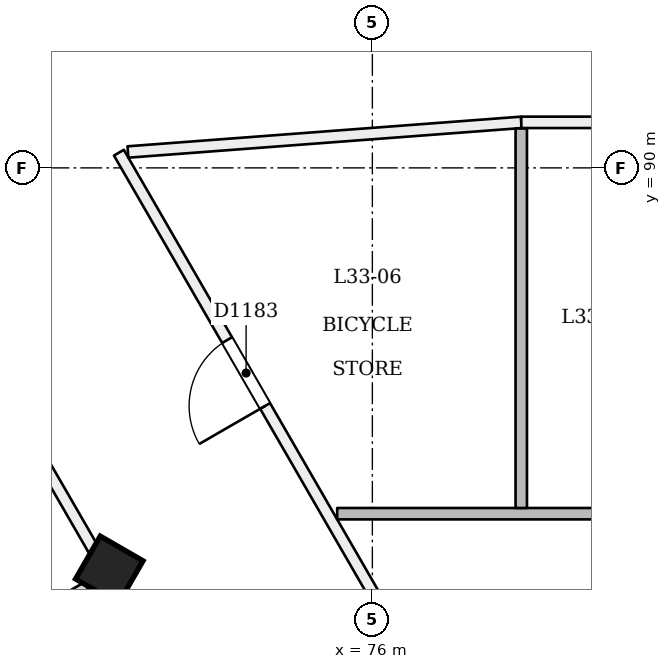
"""IFC4 building model, lengths in metres.
Left out: names, types, materials, properties, quantities, classifications, styles, units other than length and angle.
Written with IfcOpenShell. Run it as: python <this file> out.ifc"""

import sys

from ifc_helpers import new_model, si_unit, direction, frame, frame_2d, origin, origin_2d, place, context, subcontext, project, spatial, rectangle, extrude, element, fill, save


model = new_model("IFC4")
c1 = context("Model", 3, precision=1e-05, world=origin(), true_north=direction((0.0, 1.0)))
c2 = subcontext(c1, "Body", "Model", "MODEL_VIEW")
j1 = project(units=[si_unit("LENGTHUNIT", "METRE"), si_unit("PLANEANGLEUNIT", "RADIAN")], contexts=[c1])
p1 = place(None, origin())
s1 = spatial("IfcSite", under=j1, at=p1, CompositionType="ELEMENT")
p2 = place(p1, origin())
s2 = spatial("IfcBuilding", under=s1, at=p2, CompositionType="ELEMENT")
p3 = place(p2, frame((0.0, 0.0, 131.4)))
s3 = spatial("IfcBuildingStorey", under=s2, at=p3, CompositionType="ELEMENT", Elevation=131.4)
p4 = place(p3, frame((72.512, 84.664, -0.02), z_axis=(0.02215519141, 0.038415882353, 0.999016199807), x_axis=(-0.86536461293, -0.499669007942, 0.038405327632)))
e1 = element("IfcColumn", 1, at=p4, inside=s3, PredefinedType="COLUMN", context=c2, shape_type="SweptSolid", body=[
    extrude(rectangle(XDim=0.65, YDim=0.65, at=origin_2d()), origin(), (0.0, 0.0, 1.0), 3.604),
])
p5 = place(p3, frame((85.0, 68.836, 0.0), z_axis=(0.0, 0.0, 1.0), x_axis=(-0.500001726771, 0.86602440683, 0.0)))
e2 = element("IfcWall", 2, at=p5, inside=s3, PredefinedType="PARTITIONING", context=c2, shape_type="SweptSolid", body=[
    extrude(rectangle(XDim=24.669, YDim=0.15, at=frame_2d((12.335, 0.0))), origin(), (0.0, 0.0, 1.0), 3.15),
])
p6 = place(p5, frame((2.99, 0.0, 0.0)))
e3 = element("IfcOpeningElement", 3, at=p6, cuts=e2, PredefinedType="OPENING", context=c2, shape_type="SweptSolid", body=[
    extrude(rectangle(XDim=1.0, YDim=2.1, at=frame_2d((0.5, 1.05))), frame((0.0, 0.085, 0.0), z_axis=(0.0, -1.0, 0.0), x_axis=(1.0, 0.0, 0.0)), (0.0, 0.0, 1.0), 0.171),
])
p7 = place(p5, frame((15.596, 0.0, 0.0)))
e4 = element("IfcOpeningElement", 4, at=p7, cuts=e2, PredefinedType="OPENING", context=c2, shape_type="SweptSolid", body=[
    extrude(rectangle(XDim=1.0, YDim=2.1, at=frame_2d((0.5, 1.05))), frame((0.0, 0.085, 0.0), z_axis=(0.0, -1.0, 0.0), x_axis=(1.0, 0.0, 0.0)), (0.0, 0.0, 1.0), 0.171),
])
p8 = place(p5, frame((20.822, 0.0, 0.0)))
e5 = element("IfcOpeningElement", 5, at=p8, cuts=e2, PredefinedType="OPENING", context=c2, shape_type="SweptSolid", body=[
    extrude(rectangle(XDim=1.0, YDim=2.1, at=frame_2d((0.5, 1.05))), frame((0.0, 0.085, 0.0), z_axis=(0.0, -1.0, 0.0), x_axis=(1.0, 0.0, 0.0)), (0.0, 0.0, 1.0), 0.171),
])
p9 = place(p5, frame((11.43, 0.0, 0.0)))
e6 = element("IfcOpeningElement", 6, at=p9, cuts=e2, PredefinedType="OPENING", context=c2, shape_type="SweptSolid", body=[
    extrude(rectangle(XDim=1.0, YDim=2.1, at=frame_2d((0.5, 1.05))), frame((0.0, 0.085, 0.0), z_axis=(0.0, -1.0, 0.0), x_axis=(1.0, 0.0, 0.0)), (0.0, 0.0, 1.0), 0.171),
])
p10 = place(p5, frame((7.41, 0.0, 0.0)))
e7 = element("IfcOpeningElement", 7, at=p10, cuts=e2, PredefinedType="OPENING", context=c2, shape_type="SweptSolid", body=[
    extrude(rectangle(XDim=1.0, YDim=2.1, at=frame_2d((0.5, 1.05))), frame((0.0, 0.085, 0.0), z_axis=(0.0, -1.0, 0.0), x_axis=(1.0, 0.0, 0.0)), (0.0, 0.0, 1.0), 0.171),
])
p11 = place(p3, frame((72.784, 90.209, 0.0), z_axis=(0.0, 0.0, 1.0), x_axis=(0.997170112463, 0.075178233616, 0.0)))
e8 = element("IfcWall", 8, at=p11, inside=s3, PredefinedType="PARTITIONING", context=c2, shape_type="SweptSolid", body=[
    extrude(rectangle(XDim=5.189, YDim=0.15, at=frame_2d((2.595, 0.0))), origin(), (0.0, 0.0, 1.0), 3.15),
])
p12 = place(p3, frame((77.959, 90.599, 0.0), z_axis=(0.0, 0.0, 1.0), x_axis=(0.9999999708, 0.000241662632, 0.0)))
e9 = element("IfcWall", 9, at=p12, inside=s3, PredefinedType="PARTITIONING", context=c2, shape_type="SweptSolid", body=[
    extrude(rectangle(XDim=4.041, YDim=0.15, at=frame_2d((2.021, 0.0))), origin(), (0.0, 0.0, 1.0), 3.15),
])
p13 = place(p12, frame((1.52, 0.0, 0.0)))
e10 = element("IfcOpeningElement", 10, at=p13, cuts=e9, PredefinedType="OPENING", context=c2, shape_type="SweptSolid", body=[
    extrude(rectangle(XDim=1.0, YDim=2.1, at=frame_2d((0.5, 1.05))), frame((0.0, 0.085, 0.0), z_axis=(0.0, -1.0, 0.0), x_axis=(1.0, 0.0, 0.0)), (0.0, 0.0, 1.0), 0.171),
])
p14 = place(p3, frame((64.656, 98.273, 0.0), z_axis=(0.0, 0.0, 1.0), x_axis=(0.500001784794, -0.866024373331, 0.0)))
e11 = element("IfcWall", 11, at=p14, inside=s3, PredefinedType="PARTITIONING", context=c2, shape_type="SweptSolid", body=[
    extrude(rectangle(XDim=40.426, YDim=0.15, at=frame_2d((20.213, 0.0))), origin(), (0.0, 0.0, 1.0), 2.75),
])
p15 = place(p14, frame((0.2, 0.0, 0.0)))
e12 = element("IfcOpeningElement", 12, at=p15, cuts=e11, PredefinedType="OPENING", context=c2, shape_type="SweptSolid", body=[
    extrude(rectangle(XDim=1.2, YDim=2.1, at=frame_2d((0.6, 1.05))), frame((0.0, 0.085, 0.0), z_axis=(0.0, -1.0, 0.0), x_axis=(1.0, 0.0, 0.0)), (0.0, 0.0, 1.0), 0.171),
])
p16 = place(p14, frame((2.933, 0.0, 0.0)))
e13 = element("IfcOpeningElement", 13, at=p16, cuts=e11, PredefinedType="OPENING", context=c2, shape_type="SweptSolid", body=[
    extrude(rectangle(XDim=1.0, YDim=2.1, at=frame_2d((0.5, 1.05))), frame((0.0, 0.085, 0.0), z_axis=(0.0, -1.0, 0.0), x_axis=(1.0, 0.0, 0.0)), (0.0, 0.0, 1.0), 0.171),
])
p17 = place(p14, frame((9.608, 0.0, 0.0)))
e14 = element("IfcOpeningElement", 14, at=p17, cuts=e11, PredefinedType="OPENING", context=c2, shape_type="SweptSolid", body=[
    extrude(rectangle(XDim=1.0, YDim=2.1, at=frame_2d((0.5, 1.05))), frame((0.0, 0.085, 0.0), z_axis=(0.0, -1.0, 0.0), x_axis=(1.0, 0.0, 0.0)), (0.0, 0.0, 1.0), 0.171),
])
p18 = place(p14, frame((11.818, 0.0, 0.0)))
e15 = element("IfcOpeningElement", 15, at=p18, cuts=e11, PredefinedType="OPENING", context=c2, shape_type="SweptSolid", body=[
    extrude(rectangle(XDim=1.0, YDim=2.1, at=frame_2d((0.5, 1.05))), frame((0.0, 0.085, 0.0), z_axis=(0.0, -1.0, 0.0), x_axis=(1.0, 0.0, 0.0)), (0.0, 0.0, 1.0), 0.171),
])
p19 = place(p14, frame((18.493, 0.0, 0.0)))
e16 = element("IfcOpeningElement", 16, at=p19, cuts=e11, PredefinedType="OPENING", context=c2, shape_type="SweptSolid", body=[
    extrude(rectangle(XDim=1.0, YDim=2.1, at=frame_2d((0.5, 1.05))), frame((0.0, 0.085, 0.0), z_axis=(0.0, -1.0, 0.0), x_axis=(1.0, 0.0, 0.0)), (0.0, 0.0, 1.0), 0.171),
])
p20 = place(p14, frame((21.963, 0.0, 0.0)))
e17 = element("IfcOpeningElement", 17, at=p20, cuts=e11, PredefinedType="OPENING", context=c2, shape_type="SweptSolid", body=[
    extrude(rectangle(XDim=1.0, YDim=2.1, at=frame_2d((0.5, 1.05))), frame((0.0, 0.085, 0.0), z_axis=(0.0, -1.0, 0.0), x_axis=(1.0, 0.0, 0.0)), (0.0, 0.0, 1.0), 0.171),
])
p21 = place(p14, frame((27.493, 0.0, 0.0)))
e18 = element("IfcOpeningElement", 18, at=p21, cuts=e11, PredefinedType="OPENING", context=c2, shape_type="SweptSolid", body=[
    extrude(rectangle(XDim=1.0, YDim=2.1, at=frame_2d((0.5, 1.05))), frame((0.0, 0.085, 0.0), z_axis=(0.0, -1.0, 0.0), x_axis=(1.0, 0.0, 0.0)), (0.0, 0.0, 1.0), 0.171),
])
p22 = place(p14, frame((30.963, 0.0, 0.0)))
e19 = element("IfcOpeningElement", 19, at=p22, cuts=e11, PredefinedType="OPENING", context=c2, shape_type="SweptSolid", body=[
    extrude(rectangle(XDim=1.0, YDim=2.1, at=frame_2d((0.5, 1.05))), frame((0.0, 0.085, 0.0), z_axis=(0.0, -1.0, 0.0), x_axis=(1.0, 0.0, 0.0)), (0.0, 0.0, 1.0), 0.171),
])
p23 = place(p14, frame((36.493, 0.0, 0.0)))
e20 = element("IfcOpeningElement", 20, at=p23, cuts=e11, PredefinedType="OPENING", context=c2, shape_type="SweptSolid", body=[
    extrude(rectangle(XDim=1.0, YDim=2.1, at=frame_2d((0.5, 1.05))), frame((0.0, 0.085, 0.0), z_axis=(0.0, -1.0, 0.0), x_axis=(1.0, 0.0, 0.0)), (0.0, 0.0, 1.0), 0.171),
])
p24 = place(p14, frame((39.101, 0.0, 0.0)))
e21 = element("IfcOpeningElement", 21, at=p24, cuts=e11, PredefinedType="OPENING", context=c2, shape_type="SweptSolid", body=[
    extrude(rectangle(XDim=1.0, YDim=2.1, at=frame_2d((0.5, 1.05))), frame((0.0, 0.085, 0.0), z_axis=(0.0, -1.0, 0.0), x_axis=(1.0, 0.0, 0.0)), (0.0, 0.0, 1.0), 0.171),
])
p25 = place(p3, frame((82.0, 85.451, 0.0), z_axis=(0.0, 0.0, 1.0), x_axis=(-1.0, 0.0, 0.0)))
e22 = element("IfcWall", 22, at=p25, inside=s3, PredefinedType="PARTITIONING", context=c2, shape_type="SweptSolid", body=[
    extrude(rectangle(XDim=6.463, YDim=0.15, at=frame_2d((3.231, 0.0))), origin(), (0.0, 0.0, 1.0), 3.15),
])
p26 = place(p3, frame((77.959, 85.526, 0.0), z_axis=(0.0, 0.0, 1.0), x_axis=(0.0, 1.0, 0.0)))
e23 = element("IfcWall", 23, at=p26, inside=s3, PredefinedType="PARTITIONING", context=c2, shape_type="SweptSolid", body=[
    extrude(rectangle(XDim=4.992, YDim=0.15, at=frame_2d((2.496, 0.0))), origin(), (0.0, 0.0, 1.0), 3.15),
])
p27 = place(p3, frame((70.001, 83.215, 0.0), z_axis=(0.0, 0.0, 1.0), x_axis=(0.865989837833, 0.500061596976, 0.0)))
e24 = element("IfcWall", 24, at=p27, inside=s3, PredefinedType="PARTITIONING", context=c2, shape_type="SweptSolid", body=[
    extrude(rectangle(XDim=2.825, YDim=0.1, at=frame_2d((1.413, 0.0))), origin(), (0.0, 0.0, 1.0), 2.75),
])
p28 = place(p8, origin())
e25 = element("IfcDoor", 25, at=p28, inside=s3, OperationType="SINGLE_SWING_LEFT", PredefinedType="NOTDEFINED", context=c2, shape_type="SweptSolid", body=[
    extrude(rectangle(XDim=1.0, YDim=2.1, at=frame_2d((0.5, 1.05))), frame((0.0, 0.025, 0.0), z_axis=(0.0, -1.0, 0.0), x_axis=(1.0, 0.0, 0.0)), (0.0, 0.0, 1.0), 0.05),
])
fill(e5, e25)
save(model, sys.argv[1])
